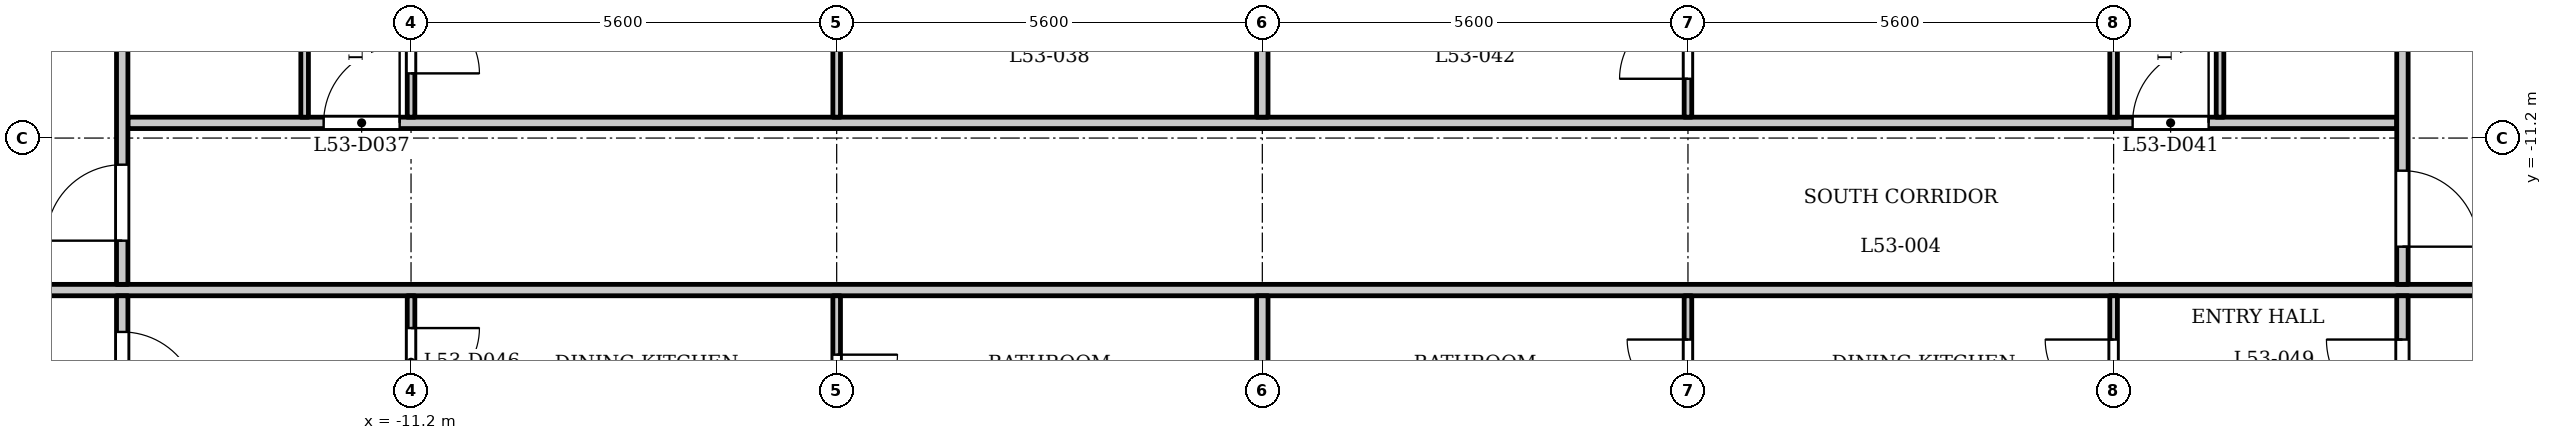
"""IFC4 building model, lengths in metres.
Left out: names, types, materials, properties, quantities, classifications, styles, units other than length and angle.
Written with IfcOpenShell. Run it as: python <this file> out.ifc"""

import sys

from ifc_helpers import new_model, si_unit, direction, frame, frame_2d, origin, place, context, subcontext, project, spatial, rectangle, extrude, element, fill, save


model = new_model("IFC4")
c1 = context("Model", 3, precision=1e-05, world=origin(), true_north=direction((0.0, 1.0)))
c2 = subcontext(c1, "Body", "Model", "MODEL_VIEW")
j1 = project(units=[si_unit("LENGTHUNIT", "METRE"), si_unit("PLANEANGLEUNIT", "RADIAN")], contexts=[c1])
p1 = place(None, origin())
s1 = spatial("IfcSite", under=j1, at=p1, CompositionType="ELEMENT")
p2 = place(p1, origin())
s2 = spatial("IfcBuilding", under=s1, at=p2, CompositionType="ELEMENT")
p3 = place(p2, frame((0.0, 0.0, 206.4)))
s3 = spatial("IfcBuildingStorey", under=s2, at=p3, CompositionType="ELEMENT", Elevation=206.4)
p4 = place(p3, frame((-17.4, -13.2, 0.0), z_axis=(0.0, 0.0, 1.0), x_axis=(1.0, 0.0, 0.0)))
e1 = element("IfcWall", 1, at=p4, inside=s3, PredefinedType="PARTITIONING", context=c2, shape_type="SweptSolid", body=[
    extrude(rectangle(XDim=34.8, YDim=0.15, at=frame_2d((17.4, 0.0))), origin(), (0.0, 0.0, 1.0), 3.2),
])
p5 = place(p4, frame((0.15, 0.0, 0.0)))
e2 = element("IfcOpeningElement", 2, at=p5, cuts=e1, PredefinedType="OPENING", context=c2, shape_type="SweptSolid", body=[
    extrude(rectangle(XDim=1.0, YDim=2.1, at=frame_2d((0.5, 1.05))), frame((0.0, 0.085, 0.0), z_axis=(0.0, -1.0, 0.0), x_axis=(1.0, 0.0, 0.0)), (0.0, 0.0, 1.0), 0.17),
])
p6 = place(p4, frame((33.55, 0.0, 0.0)))
e3 = element("IfcOpeningElement", 3, at=p6, cuts=e1, PredefinedType="OPENING", context=c2, shape_type="SweptSolid", body=[
    extrude(rectangle(XDim=1.0, YDim=2.1, at=frame_2d((0.5, 1.05))), frame((0.0, 0.085, 0.0), z_axis=(0.0, -1.0, 0.0), x_axis=(1.0, 0.0, 0.0)), (0.0, 0.0, 1.0), 0.17),
])
p7 = place(p3, frame((-14.925, -11.0, 0.0), z_axis=(0.0, 0.0, 1.0), x_axis=(1.0, 0.0, 0.0)))
e4 = element("IfcWall", 4, at=p7, inside=s3, PredefinedType="PARTITIONING", context=c2, shape_type="SweptSolid", body=[
    extrude(rectangle(XDim=29.85, YDim=0.15, at=frame_2d((14.925, 0.0))), origin(), (0.0, 0.0, 1.0), 3.2),
])
p8 = place(p7, frame((2.575, 0.0, 0.0)))
e5 = element("IfcOpeningElement", 5, at=p8, cuts=e4, PredefinedType="OPENING", context=c2, shape_type="SweptSolid", body=[
    extrude(rectangle(XDim=1.0, YDim=2.1, at=frame_2d((0.5, 1.05))), frame((0.0, 0.085, 0.0), z_axis=(0.0, -1.0, 0.0), x_axis=(1.0, 0.0, 0.0)), (0.0, 0.0, 1.0), 0.17),
])
p9 = place(p7, frame((26.375, 0.0, 0.0)))
e6 = element("IfcOpeningElement", 6, at=p9, cuts=e4, PredefinedType="OPENING", context=c2, shape_type="SweptSolid", body=[
    extrude(rectangle(XDim=1.0, YDim=2.1, at=frame_2d((0.5, 1.05))), frame((0.0, 0.085, 0.0), z_axis=(0.0, -1.0, 0.0), x_axis=(1.0, 0.0, 0.0)), (0.0, 0.0, 1.0), 0.17),
])
p10 = place(p3, frame((-15.0, -15.325, 0.0), z_axis=(0.0, 0.0, 1.0), x_axis=(0.0, 1.0, 0.0)))
e7 = element("IfcWall", 7, at=p10, inside=s3, PredefinedType="PARTITIONING", context=c2, shape_type="SweptSolid", body=[
    extrude(rectangle(XDim=2.05, YDim=0.15, at=frame_2d((1.025, 0.0))), origin(), (0.0, 0.0, 1.0), 3.2),
])
p11 = place(p10, frame((0.574, 0.0, 0.0)))
e8 = element("IfcOpeningElement", 8, at=p11, cuts=e7, PredefinedType="OPENING", context=c2, shape_type="SweptSolid", body=[
    extrude(rectangle(XDim=1.0, YDim=2.1, at=frame_2d((0.5, 1.05))), frame((0.0, 0.085, 0.0), z_axis=(0.0, -1.0, 0.0), x_axis=(1.0, 0.0, 0.0)), (0.0, 0.0, 1.0), 0.17),
])
p12 = place(p3, frame((-15.0, -13.125, 0.0), z_axis=(0.0, 0.0, 1.0), x_axis=(0.0, 1.0, 0.0)))
e9 = element("IfcWall", 9, at=p12, inside=s3, PredefinedType="PARTITIONING", context=c2, shape_type="SweptSolid", body=[
    extrude(rectangle(XDim=6.356, YDim=0.15, at=frame_2d((3.178, 0.0))), origin(), (0.0, 0.0, 1.0), 3.2),
])
p13 = place(p12, frame((0.575, 0.0, 0.0)))
e10 = element("IfcOpeningElement", 10, at=p13, cuts=e9, PredefinedType="OPENING", context=c2, shape_type="SweptSolid", body=[
    extrude(rectangle(XDim=1.0, YDim=2.1, at=frame_2d((0.5, 1.05))), frame((0.0, 0.085, 0.0), z_axis=(0.0, -1.0, 0.0), x_axis=(1.0, 0.0, 0.0)), (0.0, 0.0, 1.0), 0.17),
])
p14 = place(p3, frame((-12.6, -10.925, 0.0), z_axis=(0.0, 0.0, 1.0), x_axis=(0.0, 1.0, 0.0)))
e11 = element("IfcWall", 11, at=p14, inside=s3, PredefinedType="PARTITIONING", context=c2, shape_type="SweptSolid", body=[
    extrude(rectangle(XDim=3.605, YDim=0.1, at=frame_2d((1.802, 0.0))), origin(), (0.0, 0.0, 1.0), 3.2),
])
p15 = place(p14, frame((1.105, 0.0, 0.0)))
e12 = element("IfcOpeningElement", 12, at=p15, cuts=e11, PredefinedType="OPENING", context=c2, shape_type="SweptSolid", body=[
    extrude(rectangle(XDim=0.8, YDim=2.1, at=frame_2d((0.4, 1.05))), frame((0.0, 0.06, 0.0), z_axis=(0.0, -1.0, 0.0), x_axis=(1.0, 0.0, 0.0)), (0.0, 0.0, 1.0), 0.12),
])
p16 = place(p3, frame((-11.2, -16.45, 0.0), z_axis=(0.0, 0.0, 1.0), x_axis=(0.0, 1.0, 0.0)))
e13 = element("IfcWall", 13, at=p16, inside=s3, PredefinedType="PARTITIONING", context=c2, shape_type="SweptSolid", body=[
    extrude(rectangle(XDim=3.175, YDim=0.1, at=frame_2d((1.587, 0.0))), origin(), (0.0, 0.0, 1.0), 3.2),
])
p17 = place(p16, frame((1.85, 0.0, 0.0)))
e14 = element("IfcOpeningElement", 14, at=p17, cuts=e13, PredefinedType="OPENING", context=c2, shape_type="SweptSolid", body=[
    extrude(rectangle(XDim=0.9, YDim=2.1, at=frame_2d((0.45, 1.05))), frame((0.0, 0.06, 0.0), z_axis=(0.0, -1.0, 0.0), x_axis=(1.0, 0.0, 0.0)), (0.0, 0.0, 1.0), 0.12),
])
p18 = place(p3, frame((-11.2, -10.925, 0.0), z_axis=(0.0, 0.0, 1.0), x_axis=(0.0, 1.0, 0.0)))
e15 = element("IfcWall", 15, at=p18, inside=s3, PredefinedType="PARTITIONING", context=c2, shape_type="SweptSolid", body=[
    extrude(rectangle(XDim=3.605, YDim=0.1, at=frame_2d((1.802, 0.0))), origin(), (0.0, 0.0, 1.0), 3.2),
])
p19 = place(p18, frame((0.576, 0.0, 0.0)))
e16 = element("IfcOpeningElement", 16, at=p19, cuts=e15, PredefinedType="OPENING", context=c2, shape_type="SweptSolid", body=[
    extrude(rectangle(XDim=0.9, YDim=2.1, at=frame_2d((0.45, 1.05))), frame((0.0, 0.06, 0.0), z_axis=(0.0, -1.0, 0.0), x_axis=(1.0, 0.0, 0.0)), (0.0, 0.0, 1.0), 0.12),
])
p20 = place(p3, frame((-5.6, -16.45, 0.0), z_axis=(0.0, 0.0, 1.0), x_axis=(0.0, 1.0, 0.0)))
e17 = element("IfcWall", 17, at=p20, inside=s3, PredefinedType="PARTITIONING", context=c2, shape_type="SweptSolid", body=[
    extrude(rectangle(XDim=3.175, YDim=0.1, at=frame_2d((1.587, 0.0))), origin(), (0.0, 0.0, 1.0), 3.2),
])
p21 = place(p20, frame((1.6, 0.0, 0.0)))
e18 = element("IfcOpeningElement", 18, at=p21, cuts=e17, PredefinedType="OPENING", context=c2, shape_type="SweptSolid", body=[
    extrude(rectangle(XDim=0.8, YDim=2.1, at=frame_2d((0.4, 1.05))), frame((0.0, 0.06, 0.0), z_axis=(0.0, -1.0, 0.0), x_axis=(1.0, 0.0, 0.0)), (0.0, 0.0, 1.0), 0.12),
])
p22 = place(p3, frame((-5.6, -10.925, 0.0), z_axis=(0.0, 0.0, 1.0), x_axis=(0.0, 1.0, 0.0)))
e19 = element("IfcWall", 19, at=p22, inside=s3, PredefinedType="PARTITIONING", context=c2, shape_type="SweptSolid", body=[
    extrude(rectangle(XDim=3.605, YDim=0.1, at=frame_2d((1.802, 0.0))), origin(), (0.0, 0.0, 1.0), 3.2),
])
p23 = place(p22, frame((1.076, 0.0, 0.0)))
e20 = element("IfcOpeningElement", 20, at=p23, cuts=e19, PredefinedType="OPENING", context=c2, shape_type="SweptSolid", body=[
    extrude(rectangle(XDim=0.9, YDim=2.1, at=frame_2d((0.45, 1.05))), frame((0.0, 0.06, 0.0), z_axis=(0.0, -1.0, 0.0), x_axis=(1.0, 0.0, 0.0)), (0.0, 0.0, 1.0), 0.12),
])
p24 = place(p3, frame((0.0, -16.45, 0.0), z_axis=(0.0, 0.0, 1.0), x_axis=(0.0, 1.0, 0.0)))
e21 = element("IfcWall", 21, at=p24, inside=s3, PredefinedType="PARTITIONING", context=c2, shape_type="SweptSolid", body=[
    extrude(rectangle(XDim=3.175, YDim=0.15, at=frame_2d((1.587, 0.0))), origin(), (0.0, 0.0, 1.0), 3.2),
])
p25 = place(p3, frame((0.0, -10.925, 0.0), z_axis=(0.0, 0.0, 1.0), x_axis=(0.0, 1.0, 0.0)))
e22 = element("IfcWall", 22, at=p25, inside=s3, PredefinedType="PARTITIONING", context=c2, shape_type="SweptSolid", body=[
    extrude(rectangle(XDim=3.605, YDim=0.15, at=frame_2d((1.802, 0.0))), origin(), (0.0, 0.0, 1.0), 3.2),
])
p26 = place(p3, frame((5.6, -16.45, 0.0), z_axis=(0.0, 0.0, 1.0), x_axis=(0.0, 1.0, 0.0)))
e23 = element("IfcWall", 23, at=p26, inside=s3, PredefinedType="PARTITIONING", context=c2, shape_type="SweptSolid", body=[
    extrude(rectangle(XDim=3.175, YDim=0.1, at=frame_2d((1.587, 0.0))), origin(), (0.0, 0.0, 1.0), 3.2),
])
p27 = place(p26, frame((1.799, 0.0, 0.0)))
e24 = element("IfcOpeningElement", 24, at=p27, cuts=e23, PredefinedType="OPENING", context=c2, shape_type="SweptSolid", body=[
    extrude(rectangle(XDim=0.8, YDim=2.1, at=frame_2d((0.4, 1.05))), frame((0.0, 0.06, 0.0), z_axis=(0.0, -1.0, 0.0), x_axis=(1.0, 0.0, 0.0)), (0.0, 0.0, 1.0), 0.12),
])
p28 = place(p3, frame((5.6, -10.925, 0.0), z_axis=(0.0, 0.0, 1.0), x_axis=(0.0, 1.0, 0.0)))
e25 = element("IfcWall", 25, at=p28, inside=s3, PredefinedType="PARTITIONING", context=c2, shape_type="SweptSolid", body=[
    extrude(rectangle(XDim=3.605, YDim=0.1, at=frame_2d((1.802, 0.0))), origin(), (0.0, 0.0, 1.0), 3.2),
])
p29 = place(p28, frame((0.505, 0.0, 0.0)))
e26 = element("IfcOpeningElement", 26, at=p29, cuts=e25, PredefinedType="OPENING", context=c2, shape_type="SweptSolid", body=[
    extrude(rectangle(XDim=0.9, YDim=2.1, at=frame_2d((0.45, 1.05))), frame((0.0, 0.06, 0.0), z_axis=(0.0, -1.0, 0.0), x_axis=(1.0, 0.0, 0.0)), (0.0, 0.0, 1.0), 0.12),
])
p30 = place(p3, frame((11.2, -16.45, 0.0), z_axis=(0.0, 0.0, 1.0), x_axis=(0.0, 1.0, 0.0)))
e27 = element("IfcWall", 27, at=p30, inside=s3, PredefinedType="PARTITIONING", context=c2, shape_type="SweptSolid", body=[
    extrude(rectangle(XDim=3.175, YDim=0.1, at=frame_2d((1.587, 0.0))), origin(), (0.0, 0.0, 1.0), 3.2),
])
p31 = place(p30, frame((1.699, 0.0, 0.0)))
e28 = element("IfcOpeningElement", 28, at=p31, cuts=e27, PredefinedType="OPENING", context=c2, shape_type="SweptSolid", body=[
    extrude(rectangle(XDim=0.9, YDim=2.1, at=frame_2d((0.45, 1.05))), frame((0.0, 0.06, 0.0), z_axis=(0.0, -1.0, 0.0), x_axis=(1.0, 0.0, 0.0)), (0.0, 0.0, 1.0), 0.12),
])
p32 = place(p3, frame((11.2, -10.925, 0.0), z_axis=(0.0, 0.0, 1.0), x_axis=(0.0, 1.0, 0.0)))
e29 = element("IfcWall", 29, at=p32, inside=s3, PredefinedType="PARTITIONING", context=c2, shape_type="SweptSolid", body=[
    extrude(rectangle(XDim=3.605, YDim=0.1, at=frame_2d((1.802, 0.0))), origin(), (0.0, 0.0, 1.0), 3.2),
])
p33 = place(p32, frame((1.005, 0.0, 0.0)))
e30 = element("IfcOpeningElement", 30, at=p33, cuts=e29, PredefinedType="OPENING", context=c2, shape_type="SweptSolid", body=[
    extrude(rectangle(XDim=0.9, YDim=2.1, at=frame_2d((0.45, 1.05))), frame((0.0, 0.06, 0.0), z_axis=(0.0, -1.0, 0.0), x_axis=(1.0, 0.0, 0.0)), (0.0, 0.0, 1.0), 0.12),
])
p34 = place(p3, frame((12.6, -10.925, 0.0), z_axis=(0.0, 0.0, 1.0), x_axis=(0.0, 1.0, 0.0)))
e31 = element("IfcWall", 31, at=p34, inside=s3, PredefinedType="PARTITIONING", context=c2, shape_type="SweptSolid", body=[
    extrude(rectangle(XDim=3.605, YDim=0.1, at=frame_2d((1.802, 0.0))), origin(), (0.0, 0.0, 1.0), 3.2),
])
p35 = place(p34, frame((1.076, 0.0, 0.0)))
e32 = element("IfcOpeningElement", 32, at=p35, cuts=e31, PredefinedType="OPENING", context=c2, shape_type="SweptSolid", body=[
    extrude(rectangle(XDim=0.8, YDim=2.1, at=frame_2d((0.4, 1.05))), frame((0.0, 0.06, 0.0), z_axis=(0.0, -1.0, 0.0), x_axis=(1.0, 0.0, 0.0)), (0.0, 0.0, 1.0), 0.12),
])
p36 = place(p3, frame((15.0, -15.325, 0.0), z_axis=(0.0, 0.0, 1.0), x_axis=(0.0, 1.0, 0.0)))
e33 = element("IfcWall", 33, at=p36, inside=s3, PredefinedType="PARTITIONING", context=c2, shape_type="SweptSolid", body=[
    extrude(rectangle(XDim=2.05, YDim=0.15, at=frame_2d((1.025, 0.0))), origin(), (0.0, 0.0, 1.0), 3.2),
])
p37 = place(p36, frame((0.474, 0.0, 0.0)))
e34 = element("IfcOpeningElement", 34, at=p37, cuts=e33, PredefinedType="OPENING", context=c2, shape_type="SweptSolid", body=[
    extrude(rectangle(XDim=1.0, YDim=2.1, at=frame_2d((0.5, 1.05))), frame((0.0, 0.085, 0.0), z_axis=(0.0, -1.0, 0.0), x_axis=(1.0, 0.0, 0.0)), (0.0, 0.0, 1.0), 0.17),
])
p38 = place(p3, frame((15.0, -13.125, 0.0), z_axis=(0.0, 0.0, 1.0), x_axis=(0.0, 1.0, 0.0)))
e35 = element("IfcWall", 35, at=p38, inside=s3, PredefinedType="PARTITIONING", context=c2, shape_type="SweptSolid", body=[
    extrude(rectangle(XDim=6.356, YDim=0.15, at=frame_2d((3.178, 0.0))), origin(), (0.0, 0.0, 1.0), 3.2),
])
p39 = place(p38, frame((0.496, 0.0, 0.0)))
e36 = element("IfcOpeningElement", 36, at=p39, cuts=e35, PredefinedType="OPENING", context=c2, shape_type="SweptSolid", body=[
    extrude(rectangle(XDim=1.0, YDim=2.1, at=frame_2d((0.5, 1.05))), frame((0.0, 0.085, 0.0), z_axis=(0.0, -1.0, 0.0), x_axis=(1.0, 0.0, 0.0)), (0.0, 0.0, 1.0), 0.17),
])
p40 = place(p13, origin())
e37 = element("IfcDoor", 37, at=p40, inside=s3, OperationType="SINGLE_SWING_RIGHT", PredefinedType="DOOR", context=c2, shape_type="SweptSolid", body=[
    extrude(rectangle(XDim=1.0, YDim=2.1, at=frame_2d((0.5, 1.05))), frame((0.0, 0.025, 0.0), z_axis=(0.0, -1.0, 0.0), x_axis=(1.0, 0.0, 0.0)), (0.0, 0.0, 1.0), 0.05),
])
fill(e10, e37)
p41 = place(p39, origin())
e38 = element("IfcDoor", 38, at=p41, inside=s3, OperationType="SINGLE_SWING_LEFT", PredefinedType="DOOR", context=c2, shape_type="SweptSolid", body=[
    extrude(rectangle(XDim=1.0, YDim=2.1, at=frame_2d((0.5, 1.05))), frame((0.0, 0.025, 0.0), z_axis=(0.0, -1.0, 0.0), x_axis=(1.0, 0.0, 0.0)), (0.0, 0.0, 1.0), 0.05),
])
fill(e36, e38)
p42 = place(p8, origin())
e39 = element("IfcDoor", 39, at=p42, inside=s3, OperationType="SINGLE_SWING_LEFT", PredefinedType="DOOR", context=c2, shape_type="SweptSolid", body=[
    extrude(rectangle(XDim=1.0, YDim=2.1, at=frame_2d((0.5, 1.05))), frame((0.0, 0.025, 0.0), z_axis=(0.0, -1.0, 0.0), x_axis=(1.0, 0.0, 0.0)), (0.0, 0.0, 1.0), 0.05),
])
fill(e5, e39)
p43 = place(p19, origin())
e40 = element("IfcDoor", 40, at=p43, inside=s3, OperationType="SINGLE_SWING_LEFT", PredefinedType="DOOR", context=c2, shape_type="SweptSolid", body=[
    extrude(rectangle(XDim=0.9, YDim=2.1, at=frame_2d((0.45, 1.05))), frame((0.0, 0.025, 0.0), z_axis=(0.0, -1.0, 0.0), x_axis=(1.0, 0.0, 0.0)), (0.0, 0.0, 1.0), 0.05),
])
fill(e16, e40)
p44 = place(p9, origin())
e41 = element("IfcDoor", 41, at=p44, inside=s3, OperationType="SINGLE_SWING_LEFT", PredefinedType="DOOR", context=c2, shape_type="SweptSolid", body=[
    extrude(rectangle(XDim=1.0, YDim=2.1, at=frame_2d((0.5, 1.05))), frame((0.0, 0.025, 0.0), z_axis=(0.0, -1.0, 0.0), x_axis=(1.0, 0.0, 0.0)), (0.0, 0.0, 1.0), 0.05),
])
fill(e6, e41)
p45 = place(p29, origin())
e42 = element("IfcDoor", 42, at=p45, inside=s3, OperationType="SINGLE_SWING_RIGHT", PredefinedType="DOOR", context=c2, shape_type="SweptSolid", body=[
    extrude(rectangle(XDim=0.9, YDim=2.1, at=frame_2d((0.45, 1.05))), frame((0.0, 0.025, 0.0), z_axis=(0.0, -1.0, 0.0), x_axis=(1.0, 0.0, 0.0)), (0.0, 0.0, 1.0), 0.05),
])
fill(e26, e42)
p46 = place(p11, origin())
e43 = element("IfcDoor", 43, at=p46, inside=s3, OperationType="SINGLE_SWING_LEFT", PredefinedType="DOOR", context=c2, shape_type="SweptSolid", body=[
    extrude(rectangle(XDim=1.0, YDim=2.1, at=frame_2d((0.5, 1.05))), frame((0.0, 0.025, 0.0), z_axis=(0.0, -1.0, 0.0), x_axis=(1.0, 0.0, 0.0)), (0.0, 0.0, 1.0), 0.05),
])
fill(e8, e43)
p47 = place(p17, origin())
e44 = element("IfcDoor", 44, at=p47, inside=s3, OperationType="SINGLE_SWING_RIGHT", PredefinedType="DOOR", context=c2, shape_type="SweptSolid", body=[
    extrude(rectangle(XDim=0.9, YDim=2.1, at=frame_2d((0.45, 1.05))), frame((0.0, 0.025, 0.0), z_axis=(0.0, -1.0, 0.0), x_axis=(1.0, 0.0, 0.0)), (0.0, 0.0, 1.0), 0.05),
])
fill(e14, e44)
p48 = place(p21, origin())
e45 = element("IfcDoor", 45, at=p48, inside=s3, OperationType="SINGLE_SWING_RIGHT", PredefinedType="DOOR", context=c2, shape_type="SweptSolid", body=[
    extrude(rectangle(XDim=0.8, YDim=2.1, at=frame_2d((0.4, 1.05))), frame((0.0, 0.025, 0.0), z_axis=(0.0, -1.0, 0.0), x_axis=(1.0, 0.0, 0.0)), (0.0, 0.0, 1.0), 0.05),
])
fill(e18, e45)
p49 = place(p37, origin())
e46 = element("IfcDoor", 46, at=p49, inside=s3, OperationType="SINGLE_SWING_LEFT", PredefinedType="DOOR", context=c2, shape_type="SweptSolid", body=[
    extrude(rectangle(XDim=1.0, YDim=2.1, at=frame_2d((0.5, 1.05))), frame((0.0, 0.025, 0.0), z_axis=(0.0, -1.0, 0.0), x_axis=(1.0, 0.0, 0.0)), (0.0, 0.0, 1.0), 0.05),
])
fill(e34, e46)
p50 = place(p31, origin())
e47 = element("IfcDoor", 47, at=p50, inside=s3, OperationType="SINGLE_SWING_LEFT", PredefinedType="DOOR", context=c2, shape_type="SweptSolid", body=[
    extrude(rectangle(XDim=0.9, YDim=2.1, at=frame_2d((0.45, 1.05))), frame((0.0, 0.025, 0.0), z_axis=(0.0, -1.0, 0.0), x_axis=(1.0, 0.0, 0.0)), (0.0, 0.0, 1.0), 0.05),
])
fill(e28, e47)
p51 = place(p27, origin())
e48 = element("IfcDoor", 48, at=p51, inside=s3, OperationType="SINGLE_SWING_LEFT", PredefinedType="DOOR", context=c2, shape_type="SweptSolid", body=[
    extrude(rectangle(XDim=0.8, YDim=2.1, at=frame_2d((0.4, 1.05))), frame((0.0, 0.025, 0.0), z_axis=(0.0, -1.0, 0.0), x_axis=(1.0, 0.0, 0.0)), (0.0, 0.0, 1.0), 0.05),
])
fill(e24, e48)
save(model, sys.argv[1])
